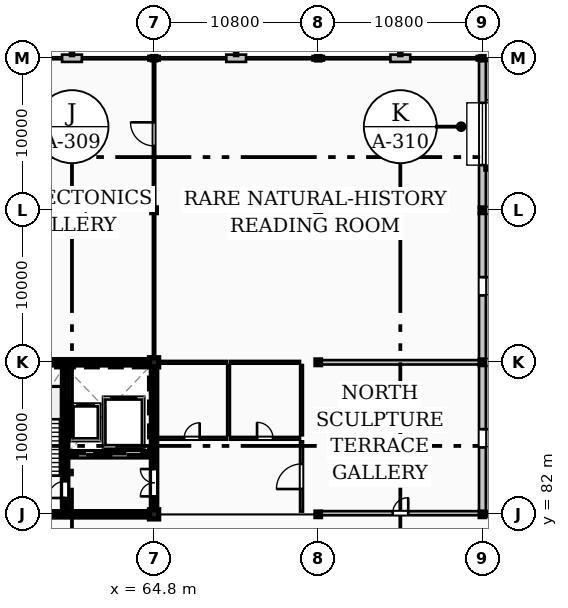
"""IFC4 building model, lengths in metres.
Left out: names, types, materials, properties, quantities, classifications, styles, units other than length and angle.
Written with IfcOpenShell. Run it as: python <this file> out.ifc"""

import sys

from ifc_helpers import new_model, si_unit, direction, frame, frame_2d, origin, origin_2d, place, context, subcontext, project, spatial, rectangle, hollow_rectangle, i_section, extrude, element, fill, save


model = new_model("IFC4")
c1 = context("Model", 3, precision=1e-05, world=origin(), true_north=direction((0.0, 1.0)))
c2 = subcontext(c1, "Body", "Model", "MODEL_VIEW")
j1 = project(units=[si_unit("LENGTHUNIT", "METRE"), si_unit("PLANEANGLEUNIT", "RADIAN")], contexts=[c1])
p1 = place(None, origin())
s1 = spatial("IfcSite", under=j1, at=p1, CompositionType="ELEMENT")
p2 = place(p1, origin())
s2 = spatial("IfcBuilding", under=s1, at=p2, CompositionType="ELEMENT")
p3 = place(p2, frame((0.0, 0.0, 24.0)))
s3 = spatial("IfcBuildingStorey", under=s2, at=p3, CompositionType="ELEMENT", Elevation=24.0)
for number, where, z_axis, x_axis in (
    (1, (64.8, 82.0, 0.0), (0.0, 0.0, 1.0), (1.0, 0.0, 0.0)),
    (2, (64.8, 92.0, 0.0), (0.0, 0.0, 1.0), (1.0, 0.0, 0.0)),
):
    element("IfcColumn", number, at=place(p3, frame(where, z_axis=z_axis, x_axis=x_axis)), inside=s3, PredefinedType="COLUMN", context=c2, shape_type="SweptSolid", body=[
        extrude(rectangle(XDim=0.6, YDim=0.6, at=origin_2d()), origin(), (0.0, 0.0, 1.0), 4.8),
    ])
p4 = place(p3, frame((64.8, 102.0, 0.0), z_axis=(0.0, 0.0, 1.0), x_axis=(1.0, 0.0, 0.0)))
e3 = element("IfcColumn", 3, at=p4, inside=s3, PredefinedType="COLUMN", context=c2, shape_type="SweptSolid", body=[
    extrude(i_section(OverallWidth=0.3, OverallDepth=0.31, WebThickness=0.009, FlangeThickness=0.015, FilletRadius=0.027, at=origin_2d()), origin(), (0.0, 0.0, 1.0), 4.8),
])
p5 = place(p3, frame((64.8, 112.0, 0.0), z_axis=(0.0, 0.0, 1.0), x_axis=(1.0, 0.0, 0.0)))
e4 = element("IfcColumn", 4, at=p5, inside=s3, PredefinedType="COLUMN", context=c2, shape_type="SweptSolid", body=[
    extrude(hollow_rectangle(XDim=0.22, YDim=0.22, WallThickness=0.012, InnerFilletRadius=0.012, OuterFilletRadius=0.025, at=origin_2d()), origin(), (0.0, 0.0, 1.0), 4.8),
])
p6 = place(p3, frame((75.6, 82.0, 0.0), z_axis=(0.0, 0.0, 1.0), x_axis=(1.0, 0.0, 0.0)))
e5 = element("IfcColumn", 5, at=p6, inside=s3, PredefinedType="COLUMN", context=c2, shape_type="SweptSolid", body=[
    extrude(hollow_rectangle(XDim=0.3, YDim=0.3, WallThickness=0.016, InnerFilletRadius=0.016, OuterFilletRadius=0.032, at=origin_2d()), origin(), (0.0, 0.0, 1.0), 4.8),
])
for number, where, z_axis, x_axis in (
    (6, (75.6, 92.0, 0.0), (0.0, 0.0, 1.0), (1.0, 0.0, 0.0)),
    (7, (75.6, 102.0, 0.0), (0.0, 0.0, 1.0), (1.0, 0.0, 0.0)),
):
    element("IfcColumn", number, at=place(p3, frame(where, z_axis=z_axis, x_axis=x_axis)), inside=s3, PredefinedType="COLUMN", context=c2, shape_type="SweptSolid", body=[
        extrude(i_section(OverallWidth=0.3, OverallDepth=0.31, WebThickness=0.009, FlangeThickness=0.015, FilletRadius=0.027, at=origin_2d()), origin(), (0.0, 0.0, 1.0), 4.8),
    ])
p7 = place(p3, frame((75.6, 112.0, 0.0), z_axis=(0.0, 0.0, 1.0), x_axis=(1.0, 0.0, 0.0)))
e8 = element("IfcColumn", 8, at=p7, inside=s3, PredefinedType="COLUMN", context=c2, shape_type="SweptSolid", body=[
    extrude(hollow_rectangle(XDim=0.22, YDim=0.22, WallThickness=0.012, InnerFilletRadius=0.012, OuterFilletRadius=0.025, at=origin_2d()), origin(), (0.0, 0.0, 1.0), 4.8),
])
p8 = place(p3, frame((86.4, 82.0, 0.0), z_axis=(0.0, 0.0, 1.0), x_axis=(1.0, 0.0, 0.0)))
e9 = element("IfcColumn", 9, at=p8, inside=s3, PredefinedType="COLUMN", context=c2, shape_type="SweptSolid", body=[
    extrude(hollow_rectangle(XDim=0.3, YDim=0.3, WallThickness=0.016, InnerFilletRadius=0.016, OuterFilletRadius=0.032, at=origin_2d()), origin(), (0.0, 0.0, 1.0), 4.8),
])
for number, where, z_axis, x_axis in (
    (10, (86.4, 92.0, 0.0), (0.0, 0.0, 1.0), (1.0, 0.0, 0.0)),
    (11, (86.4, 102.0, 0.0), (0.0, 0.0, 1.0), (1.0, 0.0, 0.0)),
):
    element("IfcColumn", number, at=place(p3, frame(where, z_axis=z_axis, x_axis=x_axis)), inside=s3, PredefinedType="COLUMN", context=c2, shape_type="SweptSolid", body=[
        extrude(i_section(OverallWidth=0.3, OverallDepth=0.31, WebThickness=0.009, FlangeThickness=0.015, FilletRadius=0.027, at=origin_2d()), origin(), (0.0, 0.0, 1.0), 4.8),
    ])
p9 = place(p3, frame((86.4, 112.0, 0.0), z_axis=(0.0, 0.0, 1.0), x_axis=(1.0, 0.0, 0.0)))
e12 = element("IfcColumn", 12, at=p9, inside=s3, PredefinedType="COLUMN", context=c2, shape_type="SweptSolid", body=[
    extrude(hollow_rectangle(XDim=0.22, YDim=0.22, WallThickness=0.012, InnerFilletRadius=0.012, OuterFilletRadius=0.025, at=origin_2d()), origin(), (0.0, 0.0, 1.0), 4.8),
])
p10 = place(p3, frame((86.77, 82.0, 0.0), z_axis=(0.0, 0.0, 1.0), x_axis=(-1.0, 0.0, 0.0)))
e13 = element("IfcWall", 13, at=p10, inside=s3, PredefinedType="STANDARD", context=c2, shape_type="SweptSolid", body=[
    extrude(rectangle(XDim=0.225, YDim=0.3, at=frame_2d((0.113, 0.0))), origin(), (0.0, 0.0, 1.0), 4.56),
])
p11 = place(p3, frame((86.4, 82.145, 0.0), z_axis=(0.0, 0.0, 1.0), x_axis=(0.0, 1.0, 0.0)))
e14 = element("IfcWall", 14, at=p11, inside=s3, PredefinedType="STANDARD", context=c2, shape_type="SweptSolid", body=[
    extrude(rectangle(XDim=9.71, YDim=0.45, at=frame_2d((4.855, 0.0))), origin(), (0.0, 0.0, 1.0), 4.56),
])
p12 = place(p11, frame((4.255, 0.0, 0.0)))
e15 = element("IfcOpeningElement", 15, at=p12, cuts=e14, PredefinedType="OPENING", context=c2, shape_type="SweptSolid", body=[
    extrude(rectangle(XDim=1.2, YDim=2.3, at=frame_2d((0.6, 1.15))), frame((0.0, 0.235, 0.0), z_axis=(0.0, -1.0, 0.0), x_axis=(1.0, 0.0, 0.0)), (0.0, 0.0, 1.0), 0.47),
])
p13 = place(p3, frame((86.4, 92.145, 0.0), z_axis=(0.0, 0.0, 1.0), x_axis=(0.0, 1.0, 0.0)))
e16 = element("IfcWall", 16, at=p13, inside=s3, PredefinedType="STANDARD", context=c2, shape_type="SweptSolid", body=[
    extrude(rectangle(XDim=9.71, YDim=0.45, at=frame_2d((4.855, 0.0))), origin(), (0.0, 0.0, 1.0), 4.56),
])
p14 = place(p13, frame((4.255, 0.0, 0.0)))
e17 = element("IfcOpeningElement", 17, at=p14, cuts=e16, PredefinedType="OPENING", context=c2, shape_type="SweptSolid", body=[
    extrude(rectangle(XDim=1.2, YDim=2.3, at=frame_2d((0.6, 1.15))), frame((0.0, 0.235, 0.0), z_axis=(0.0, -1.0, 0.0), x_axis=(1.0, 0.0, 0.0)), (0.0, 0.0, 1.0), 0.47),
])
p15 = place(p3, frame((86.4, 102.145, 0.0), z_axis=(0.0, 0.0, 1.0), x_axis=(0.0, 1.0, 0.0)))
e18 = element("IfcWall", 18, at=p15, inside=s3, PredefinedType="STANDARD", context=c2, shape_type="SweptSolid", body=[
    extrude(rectangle(XDim=9.749, YDim=0.45, at=frame_2d((4.875, 0.0))), origin(), (0.0, 0.0, 1.0), 4.56),
])
p16 = place(p15, frame((2.824, 0.0, 1.0)))
e19 = element("IfcOpeningElement", 19, at=p16, cuts=e18, PredefinedType="OPENING", context=c2, shape_type="SweptSolid", body=[
    extrude(rectangle(XDim=4.1, YDim=1.9, at=frame_2d((2.05, 0.95))), frame((0.0, 0.235, 0.0), z_axis=(0.0, -1.0, 0.0), x_axis=(1.0, 0.0, 0.0)), (0.0, 0.0, 1.0), 0.47),
])
p17 = place(p3, frame((81.65, 112.0, 0.0), z_axis=(0.0, 0.0, 1.0), x_axis=(-1.0, 0.0, 0.0)))
e20 = element("IfcWall", 20, at=p17, inside=s3, PredefinedType="STANDARD", context=c2, shape_type="SweptSolid", body=[
    extrude(rectangle(XDim=1.3, YDim=0.48, at=frame_2d((0.65, 0.0))), origin(), (0.0, 0.0, 1.0), 4.209),
])
for number, where, z_axis, x_axis in (
    (21, (86.294, 112.0, 0.0), (0.0, 0.0, 1.0), (-1.0, 0.0, 0.0)),
    (22, (75.97, 112.0, 0.0), (0.0, 0.0, 1.0), (-1.0, 0.0, 0.0)),
):
    element("IfcWall", number, at=place(p3, frame(where, z_axis=z_axis, x_axis=x_axis)), inside=s3, PredefinedType="STANDARD", context=c2, shape_type="SweptSolid", body=[
        extrude(rectangle(XDim=0.264, YDim=0.3, at=frame_2d((0.132, 0.0))), origin(), (0.0, 0.0, 1.0), 4.56),
    ])
p18 = place(p3, frame((70.85, 112.0, 0.0), z_axis=(0.0, 0.0, 1.0), x_axis=(-1.0, 0.0, 0.0)))
e23 = element("IfcWall", 23, at=p18, inside=s3, PredefinedType="STANDARD", context=c2, shape_type="SweptSolid", body=[
    extrude(rectangle(XDim=1.3, YDim=0.48, at=frame_2d((0.65, 0.0))), origin(), (0.0, 0.0, 1.0), 4.219),
])
for number, where, z_axis, x_axis in (
    (24, (75.494, 112.0, 0.0), (0.0, 0.0, 1.0), (-1.0, 0.0, 0.0)),
    (25, (65.17, 112.0, 0.0), (0.0, 0.0, 1.0), (-1.0, 0.0, 0.0)),
):
    element("IfcWall", number, at=place(p3, frame(where, z_axis=z_axis, x_axis=x_axis)), inside=s3, PredefinedType="STANDARD", context=c2, shape_type="SweptSolid", body=[
        extrude(rectangle(XDim=0.264, YDim=0.3, at=frame_2d((0.132, 0.0))), origin(), (0.0, 0.0, 1.0), 4.56),
    ])
p19 = place(p3, frame((60.05, 112.0, 0.0), z_axis=(0.0, 0.0, 1.0), x_axis=(-1.0, 0.0, 0.0)))
e26 = element("IfcWall", 26, at=p19, inside=s3, PredefinedType="STANDARD", context=c2, shape_type="SweptSolid", body=[
    extrude(rectangle(XDim=1.3, YDim=0.48, at=frame_2d((0.65, 0.0))), origin(), (0.0, 0.0, 1.0), 4.219),
])
p20 = place(p3, frame((64.694, 112.0, 0.0), z_axis=(0.0, 0.0, 1.0), x_axis=(-1.0, 0.0, 0.0)))
e27 = element("IfcWall", 27, at=p20, inside=s3, PredefinedType="STANDARD", context=c2, shape_type="SweptSolid", body=[
    extrude(rectangle(XDim=0.264, YDim=0.3, at=frame_2d((0.132, 0.0))), origin(), (0.0, 0.0, 1.0), 4.56),
])
for number, where, z_axis, x_axis in (
    (28, (54.3, 82.0, 0.0), (0.0, 0.0, 1.0), (1.0, 0.0, 0.0)),
    (29, (54.3, 92.0, 0.0), (0.0, 0.0, 1.0), (1.0, 0.0, 0.0)),
):
    element("IfcWall", number, at=place(p3, frame(where, z_axis=z_axis, x_axis=x_axis)), inside=s3, PredefinedType="SHEAR", context=c2, shape_type="SweptSolid", body=[
        extrude(rectangle(XDim=10.2, YDim=0.35, at=frame_2d((5.1, 0.0))), origin(), (0.0, 0.0, 1.0), 4.56),
    ])
p21 = place(p3, frame((64.8, 82.3, 0.0), z_axis=(0.0, 0.0, 1.0), x_axis=(0.0, 1.0, 0.0)))
e30 = element("IfcWall", 30, at=p21, inside=s3, PredefinedType="SHEAR", context=c2, shape_type="SweptSolid", body=[
    extrude(rectangle(XDim=9.4, YDim=0.35, at=frame_2d((4.7, 0.0))), origin(), (0.0, 0.0, 1.0), 4.56),
])
p22 = place(p21, frame((0.88, 0.0, 0.0)))
e31 = element("IfcOpeningElement", 31, at=p22, cuts=e30, PredefinedType="OPENING", context=c2, shape_type="SweptSolid", body=[
    extrude(rectangle(XDim=1.8, YDim=2.25, at=frame_2d((0.9, 1.125))), frame((0.0, 0.185, 0.0), z_axis=(0.0, -1.0, 0.0), x_axis=(1.0, 0.0, 0.0)), (0.0, 0.0, 1.0), 0.37),
])
p23 = place(p3, frame((58.95, 82.175, 0.0), z_axis=(0.0, 0.0, 1.0), x_axis=(0.0, 1.0, 0.0)))
e32 = element("IfcWall", 32, at=p23, inside=s3, PredefinedType="SHEAR", context=c2, shape_type="SweptSolid", body=[
    extrude(rectangle(XDim=9.65, YDim=0.35, at=frame_2d((4.825, 0.0))), origin(), (0.0, 0.0, 1.0), 4.56),
])
p24 = place(p23, frame((0.9, 0.0, 0.0)))
e33 = element("IfcOpeningElement", 33, at=p24, cuts=e32, PredefinedType="OPENING", context=c2, shape_type="SweptSolid", body=[
    extrude(rectangle(XDim=1.1, YDim=2.2, at=frame_2d((0.55, 1.1))), frame((0.0, 0.185, 0.0), z_axis=(0.0, -1.0, 0.0), x_axis=(1.0, 0.0, 0.0)), (0.0, 0.0, 1.0), 0.37),
])
p25 = place(p3, frame((59.13, 85.95, 0.0), z_axis=(0.0, 0.0, 1.0), x_axis=(1.0, 0.0, 0.0)))
e34 = element("IfcWall", 34, at=p25, inside=s3, PredefinedType="SHEAR", context=c2, shape_type="SweptSolid", body=[
    extrude(rectangle(XDim=5.49, YDim=0.35, at=frame_2d((2.745, 0.0))), origin(), (0.0, 0.0, 1.0), 4.56),
])
p26 = place(p25, frame((0.65, 0.0, 0.0)))
e35 = element("IfcOpeningElement", 35, at=p26, cuts=e34, PredefinedType="OPENING", context=c2, shape_type="SweptSolid", body=[
    extrude(rectangle(XDim=1.1, YDim=2.2, at=frame_2d((0.55, 1.1))), frame((0.0, 0.185, 0.0), z_axis=(0.0, -1.0, 0.0), x_axis=(1.0, 0.0, 0.0)), (0.0, 0.0, 1.0), 0.37),
])
p27 = place(p25, frame((2.85, 0.0, 0.0)))
e36 = element("IfcOpeningElement", 36, at=p27, cuts=e34, PredefinedType="OPENING", context=c2, shape_type="SweptSolid", body=[
    extrude(rectangle(XDim=2.0, YDim=2.5, at=frame_2d((1.0, 1.25))), frame((0.0, 0.185, 0.0), z_axis=(0.0, -1.0, 0.0), x_axis=(1.0, 0.0, 0.0)), (0.0, 0.0, 1.0), 0.37),
])
p28 = place(p3, frame((75.8, 82.075, 0.0), z_axis=(0.0, 0.0, 1.0), x_axis=(1.0, 0.0, 0.0)))
e37 = element("IfcWall", 37, at=p28, inside=s3, PredefinedType="PARTITIONING", context=c2, shape_type="SweptSolid", body=[
    extrude(rectangle(XDim=10.42, YDim=0.27, at=frame_2d((5.21, 0.0))), origin(), (0.0, 0.0, 1.0), 4.16),
])
p29 = place(p28, frame((4.7, 0.0, 0.0)))
e38 = element("IfcOpeningElement", 38, at=p29, cuts=e37, PredefinedType="OPENING", context=c2, shape_type="SweptSolid", body=[
    extrude(rectangle(XDim=1.02, YDim=2.15, at=frame_2d((0.51, 1.075))), frame((0.0, 0.145, 0.0), z_axis=(0.0, -1.0, 0.0), x_axis=(1.0, 0.0, 0.0)), (0.0, 0.0, 1.0), 0.29),
])
p30 = place(p3, frame((64.98, 87.0, 0.0), z_axis=(0.0, 0.0, 1.0), x_axis=(1.0, 0.0, 0.0)))
e39 = element("IfcWall", 39, at=p30, inside=s3, PredefinedType="PLUMBINGWALL", context=c2, shape_type="SweptSolid", body=[
    extrude(rectangle(XDim=4.62, YDim=0.18, at=frame_2d((2.31, 0.0))), origin(), (0.0, 0.0, 1.0), 4.52),
])
p31 = place(p30, frame((1.8, 0.0, 0.0)))
e40 = element("IfcOpeningElement", 40, at=p31, cuts=e39, PredefinedType="OPENING", context=c2, shape_type="SweptSolid", body=[
    extrude(rectangle(XDim=1.02, YDim=2.2, at=frame_2d((0.51, 1.1))), frame((0.0, 0.1, 0.0), z_axis=(0.0, -1.0, 0.0), x_axis=(1.0, 0.0, 0.0)), (0.0, 0.0, 1.0), 0.2),
])
p32 = place(p3, frame((69.8, 87.0, 0.0), z_axis=(0.0, 0.0, 1.0), x_axis=(1.0, 0.0, 0.0)))
e41 = element("IfcWall", 41, at=p32, inside=s3, PredefinedType="PLUMBINGWALL", context=c2, shape_type="SweptSolid", body=[
    extrude(rectangle(XDim=4.6, YDim=0.18, at=frame_2d((2.3, 0.0))), origin(), (0.0, 0.0, 1.0), 4.52),
])
p33 = place(p32, frame((1.775, 0.0, 0.0)))
e42 = element("IfcOpeningElement", 42, at=p33, cuts=e41, PredefinedType="OPENING", context=c2, shape_type="SweptSolid", body=[
    extrude(rectangle(XDim=1.05, YDim=2.15, at=frame_2d((0.525, 1.075))), frame((0.0, 0.1, 0.0), z_axis=(0.0, -1.0, 0.0), x_axis=(1.0, 0.0, 0.0)), (0.0, 0.0, 1.0), 0.2),
])
p34 = place(p3, frame((64.8, 92.18, 0.0), z_axis=(0.0, 0.0, 1.0), x_axis=(0.0, 1.0, 0.0)))
e43 = element("IfcWall", 43, at=p34, inside=s3, PredefinedType="PARTITIONING", context=c2, shape_type="SweptSolid", body=[
    extrude(rectangle(XDim=9.62, YDim=0.15, at=frame_2d((4.81, 0.0))), origin(), (0.0, 0.0, 1.0), 4.06),
])
p35 = place(p3, frame((64.8, 102.2, 0.0), z_axis=(0.0, 0.0, 1.0), x_axis=(0.0, 1.0, 0.0)))
e44 = element("IfcWall", 44, at=p35, inside=s3, PredefinedType="PARTITIONING", context=c2, shape_type="SweptSolid", body=[
    extrude(rectangle(XDim=9.62, YDim=0.15, at=frame_2d((4.81, 0.0))), origin(), (0.0, 0.0, 1.0), 4.06),
])
p36 = place(p35, frame((4.035, 0.0, 0.0)))
e45 = element("IfcOpeningElement", 45, at=p36, cuts=e44, PredefinedType="OPENING", context=c2, shape_type="SweptSolid", body=[
    extrude(rectangle(XDim=1.55, YDim=2.4, at=frame_2d((0.775, 1.2))), frame((0.0, 0.085, 0.0), z_axis=(0.0, -1.0, 0.0), x_axis=(1.0, 0.0, 0.0)), (0.0, 0.0, 1.0), 0.17),
])
p37 = place(p3, frame((74.5, 82.18, 0.0), z_axis=(0.0, 0.0, 1.0), x_axis=(0.0, 1.0, 0.0)))
e46 = element("IfcWall", 46, at=p37, inside=s3, PredefinedType="PARTITIONING", context=c2, shape_type="SweptSolid", body=[
    extrude(rectangle(XDim=4.62, YDim=0.19, at=frame_2d((2.31, 0.0))), origin(), (0.0, 0.0, 1.0), 4.52),
])
p38 = place(p37, frame((1.485, 0.0, 0.0)))
e47 = element("IfcOpeningElement", 47, at=p38, cuts=e46, PredefinedType="OPENING", context=c2, shape_type="SweptSolid", body=[
    extrude(rectangle(XDim=1.65, YDim=2.4, at=frame_2d((0.825, 1.2))), frame((0.0, 0.105, 0.0), z_axis=(0.0, -1.0, 0.0), x_axis=(1.0, 0.0, 0.0)), (0.0, 0.0, 1.0), 0.21),
])
p39 = place(p3, frame((64.98, 92.0, 0.0), z_axis=(0.0, 0.0, 1.0), x_axis=(1.0, 0.0, 0.0)))
e48 = element("IfcWall", 48, at=p39, inside=s3, PredefinedType="PLUMBINGWALL", context=c2, shape_type="SweptSolid", body=[
    extrude(rectangle(XDim=4.62, YDim=0.18, at=frame_2d((2.31, 0.0))), origin(), (0.0, 0.0, 1.0), 4.17),
])
p40 = place(p3, frame((69.8, 92.0, 0.0), z_axis=(0.0, 0.0, 1.0), x_axis=(1.0, 0.0, 0.0)))
e49 = element("IfcWall", 49, at=p40, inside=s3, PredefinedType="PLUMBINGWALL", context=c2, shape_type="SweptSolid", body=[
    extrude(rectangle(XDim=4.6, YDim=0.18, at=frame_2d((2.3, 0.0))), origin(), (0.0, 0.0, 1.0), 4.17),
])
p41 = place(p3, frame((75.8, 92.0, 0.0), z_axis=(0.0, 0.0, 1.0), x_axis=(1.0, 0.0, 0.0)))
e50 = element("IfcWall", 50, at=p41, inside=s3, PredefinedType="PARTITIONING", context=c2, shape_type="SweptSolid", body=[
    extrude(rectangle(XDim=10.42, YDim=0.29, at=frame_2d((5.21, 0.0))), origin(), (0.0, 0.0, 1.0), 4.16),
])
for number, where, z_axis, x_axis in (
    (51, (69.7, 87.2, 0.0), (0.0, 0.0, 1.0), (0.0, 1.0, 0.0)),
    (52, (74.5, 87.2, 0.0), (0.0, 0.0, 1.0), (0.0, 1.0, 0.0)),
):
    element("IfcWall", number, at=place(p3, frame(where, z_axis=z_axis, x_axis=x_axis)), inside=s3, PredefinedType="PLUMBINGWALL", context=c2, shape_type="SweptSolid", body=[
        extrude(rectangle(XDim=4.62, YDim=0.18, at=frame_2d((2.31, 0.0))), origin(), (0.0, 0.0, 1.0), 4.52),
    ])
p42 = place(p12, frame((1.2, 0.0, 0.0), z_axis=(0.0, 0.0, 1.0), x_axis=(-1.0, 0.0, 0.0)))
e53 = element("IfcDoor", 53, at=p42, inside=s3, OperationType="SINGLE_SWING_RIGHT", PredefinedType="DOOR", context=c2, shape_type="SweptSolid", body=[
    extrude(rectangle(XDim=1.2, YDim=2.3, at=frame_2d((0.6, 1.15))), frame((0.0, 0.025, 0.0), z_axis=(0.0, -1.0, 0.0), x_axis=(1.0, 0.0, 0.0)), (0.0, 0.0, 1.0), 0.05),
])
fill(e15, e53)
p43 = place(p14, frame((1.2, 0.0, 0.0), z_axis=(0.0, 0.0, 1.0), x_axis=(-1.0, 0.0, 0.0)))
e54 = element("IfcDoor", 54, at=p43, inside=s3, OperationType="SINGLE_SWING_RIGHT", PredefinedType="DOOR", context=c2, shape_type="SweptSolid", body=[
    extrude(rectangle(XDim=1.2, YDim=2.3, at=frame_2d((0.6, 1.15))), frame((0.0, 0.025, 0.0), z_axis=(0.0, -1.0, 0.0), x_axis=(1.0, 0.0, 0.0)), (0.0, 0.0, 1.0), 0.05),
])
fill(e17, e54)
p44 = place(p16, origin())
e55 = element("IfcWindow", 55, at=p44, inside=s3, PartitioningType="SINGLE_PANEL", PredefinedType="WINDOW", context=c2, shape_type="SweptSolid", body=[
    extrude(rectangle(XDim=4.1, YDim=1.9, at=frame_2d((2.05, 0.95))), frame((0.0, 0.03, 0.0), z_axis=(0.0, -1.0, 0.0), x_axis=(1.0, 0.0, 0.0)), (0.0, 0.0, 1.0), 0.06),
])
fill(e19, e55)
p45 = place(p24, origin())
e56 = element("IfcDoor", 56, at=p45, inside=s3, OperationType="SINGLE_SWING_LEFT", PredefinedType="DOOR", context=c2, shape_type="SweptSolid", body=[
    extrude(rectangle(XDim=1.1, YDim=2.2, at=frame_2d((0.55, 1.1))), frame((0.0, 0.025, 0.0), z_axis=(0.0, -1.0, 0.0), x_axis=(1.0, 0.0, 0.0)), (0.0, 0.0, 1.0), 0.05),
])
fill(e33, e56)
p46 = place(p22, origin())
e57 = element("IfcDoor", 57, at=p46, inside=s3, OperationType="DOUBLE_DOOR_SINGLE_SWING", PredefinedType="DOOR", context=c2, shape_type="SweptSolid", body=[
    extrude(rectangle(XDim=1.8, YDim=2.25, at=frame_2d((0.9, 1.125))), frame((0.0, 0.025, 0.0), z_axis=(0.0, -1.0, 0.0), x_axis=(1.0, 0.0, 0.0)), (0.0, 0.0, 1.0), 0.05),
])
fill(e31, e57)
p47 = place(p26, origin())
e58 = element("IfcDoor", 58, at=p47, inside=s3, OperationType="DOUBLE_DOOR_SLIDING", PredefinedType="DOOR", context=c2, shape_type="SweptSolid", body=[
    extrude(rectangle(XDim=1.1, YDim=2.2, at=frame_2d((0.55, 1.1))), frame((0.0, 0.025, 0.0), z_axis=(0.0, -1.0, 0.0), x_axis=(1.0, 0.0, 0.0)), (0.0, 0.0, 1.0), 0.05),
])
fill(e35, e58)
p48 = place(p27, origin())
e59 = element("IfcDoor", 59, at=p48, inside=s3, OperationType="DOUBLE_DOOR_SLIDING", PredefinedType="DOOR", context=c2, shape_type="SweptSolid", body=[
    extrude(rectangle(XDim=2.0, YDim=2.5, at=frame_2d((1.0, 1.25))), frame((0.0, 0.025, 0.0), z_axis=(0.0, -1.0, 0.0), x_axis=(1.0, 0.0, 0.0)), (0.0, 0.0, 1.0), 0.05),
])
fill(e36, e59)
p49 = place(p29, origin())
e60 = element("IfcDoor", 60, at=p49, inside=s3, OperationType="SINGLE_SWING_RIGHT", PredefinedType="DOOR", context=c2, shape_type="SweptSolid", body=[
    extrude(rectangle(XDim=1.02, YDim=2.15, at=frame_2d((0.51, 1.075))), frame((0.0, 0.025, 0.0), z_axis=(0.0, -1.0, 0.0), x_axis=(1.0, 0.0, 0.0)), (0.0, 0.0, 1.0), 0.05),
])
fill(e38, e60)
p50 = place(p31, origin())
e61 = element("IfcDoor", 61, at=p50, inside=s3, OperationType="SINGLE_SWING_RIGHT", PredefinedType="DOOR", context=c2, shape_type="SweptSolid", body=[
    extrude(rectangle(XDim=1.02, YDim=2.2, at=frame_2d((0.51, 1.1))), frame((0.0, 0.025, 0.0), z_axis=(0.0, -1.0, 0.0), x_axis=(1.0, 0.0, 0.0)), (0.0, 0.0, 1.0), 0.05),
])
fill(e40, e61)
p51 = place(p33, origin())
e62 = element("IfcDoor", 62, at=p51, inside=s3, OperationType="SINGLE_SWING_LEFT", PredefinedType="DOOR", context=c2, shape_type="SweptSolid", body=[
    extrude(rectangle(XDim=1.05, YDim=2.15, at=frame_2d((0.525, 1.075))), frame((0.0, 0.025, 0.0), z_axis=(0.0, -1.0, 0.0), x_axis=(1.0, 0.0, 0.0)), (0.0, 0.0, 1.0), 0.05),
])
fill(e42, e62)
p52 = place(p36, origin())
e63 = element("IfcDoor", 63, at=p52, inside=s3, OperationType="SINGLE_SWING_RIGHT", PredefinedType="DOOR", context=c2, shape_type="SweptSolid", body=[
    extrude(rectangle(XDim=1.55, YDim=2.4, at=frame_2d((0.775, 1.2))), frame((0.0, 0.025, 0.0), z_axis=(0.0, -1.0, 0.0), x_axis=(1.0, 0.0, 0.0)), (0.0, 0.0, 1.0), 0.05),
])
fill(e45, e63)
p53 = place(p38, origin())
e64 = element("IfcDoor", 64, at=p53, inside=s3, OperationType="SINGLE_SWING_LEFT", PredefinedType="DOOR", context=c2, shape_type="SweptSolid", body=[
    extrude(rectangle(XDim=1.65, YDim=2.4, at=frame_2d((0.825, 1.2))), frame((0.0, 0.025, 0.0), z_axis=(0.0, -1.0, 0.0), x_axis=(1.0, 0.0, 0.0)), (0.0, 0.0, 1.0), 0.05),
])
fill(e47, e64)
save(model, sys.argv[1])
